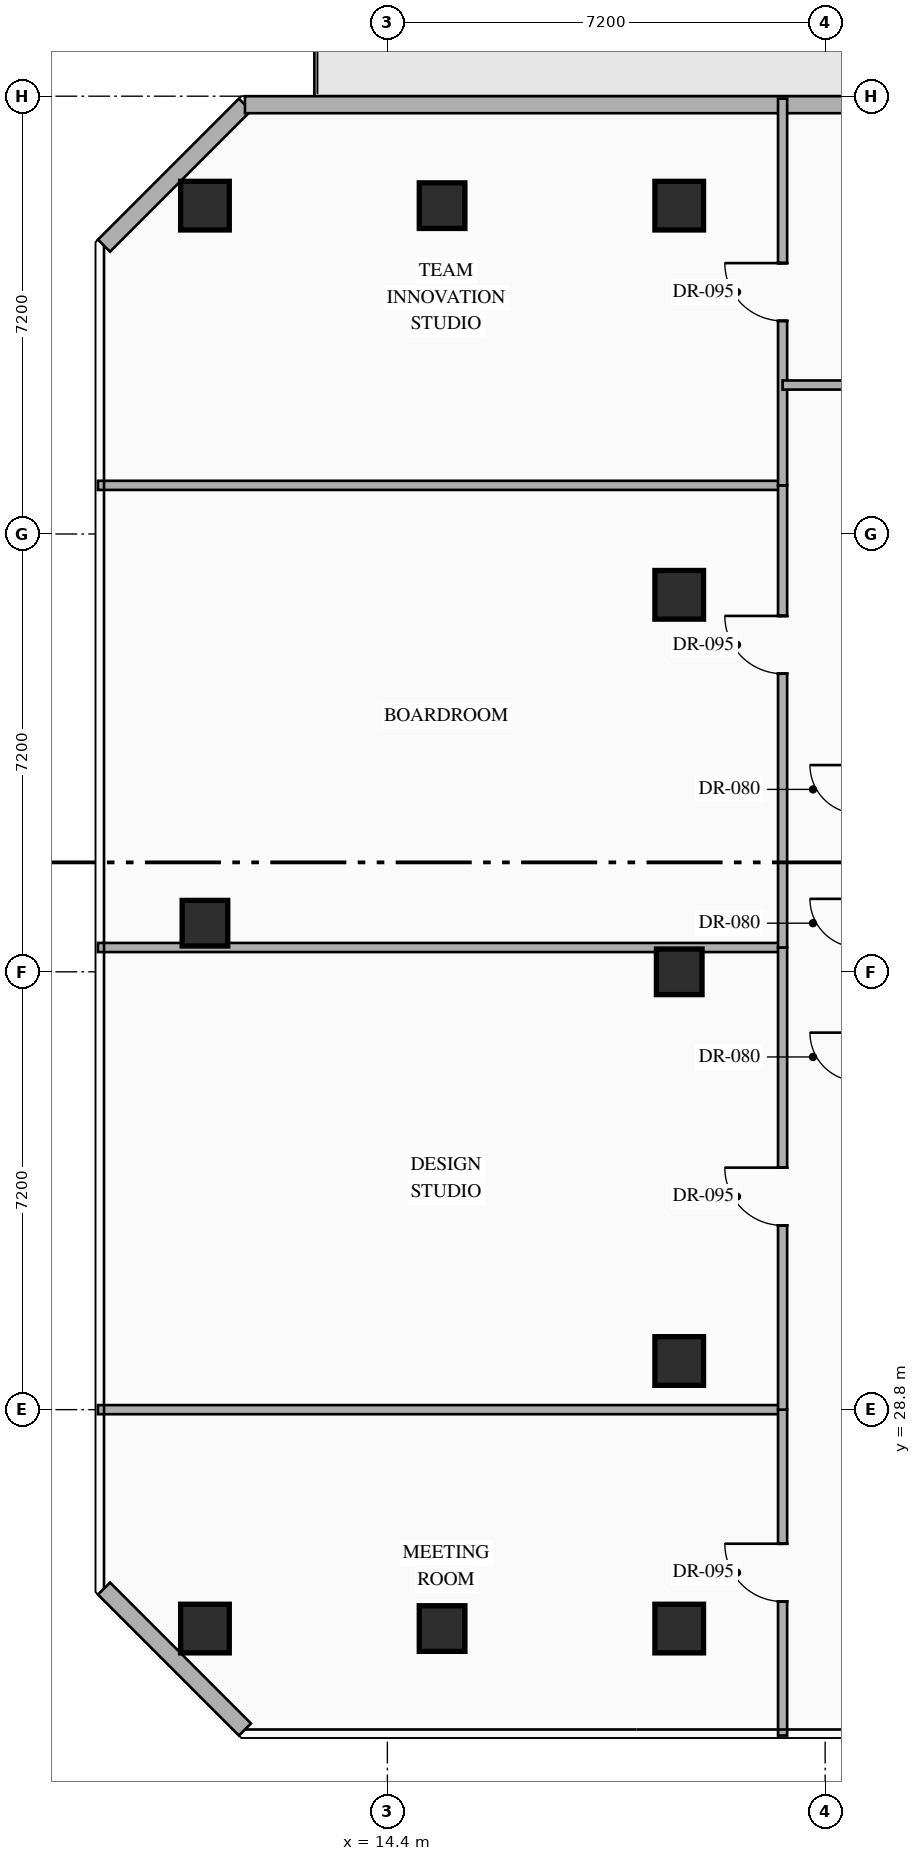
"""IFC4 building model, lengths in metres.
Left out: names, types, materials, properties, quantities, classifications, styles, units other than length and angle.
Written with IfcOpenShell. Run it as: python <this file> out.ifc"""

import sys

from ifc_helpers import new_model, si_unit, direction, frame, frame_2d, origin, origin_2d, place, context, subcontext, project, spatial, rectangle, hollow_rectangle, extrude, element, fill, save


model = new_model("IFC4")
c1 = context("Model", 3, precision=1e-05, world=origin(), true_north=direction((0.0, 1.0)))
c2 = subcontext(c1, "Body", "Model", "MODEL_VIEW")
j1 = project(units=[si_unit("LENGTHUNIT", "METRE"), si_unit("PLANEANGLEUNIT", "RADIAN")], contexts=[c1])
p1 = place(None, origin())
s1 = spatial("IfcSite", under=j1, at=p1, CompositionType="ELEMENT")
p2 = place(p1, origin())
s2 = spatial("IfcBuilding", under=s1, at=p2, CompositionType="ELEMENT")
p3 = place(p2, frame((0.0, 0.0, 178.05)))
s3 = spatial("IfcBuildingStorey", under=s2, at=p3, CompositionType="ELEMENT", Elevation=178.05)
for number, where, z_axis, x_axis in (
    (1, (11.4, 25.2, 0.0), (0.0, 0.0, 1.0), (1.0, 0.0, 0.0)),
    (2, (11.4, 48.6, 0.0), (0.0, 0.0, 1.0), (1.0, 0.0, 0.0)),
    (3, (19.2, 48.6, 0.0), (0.0, 0.0, 1.0), (1.0, 0.0, 0.0)),
    (4, (19.2, 25.2, 0.0), (0.0, 0.0, 1.0), (1.0, 0.0, 0.0)),
    (5, (19.2, 29.6, 0.0), (0.0, 0.0, 1.0), (1.0, 0.0, 0.0)),
    (6, (19.2, 42.2, 0.0), (0.0, 0.0, 1.0), (1.0, 0.0, 0.0)),
):
    element("IfcColumn", number, at=place(p3, frame(where, z_axis=z_axis, x_axis=x_axis)), inside=s3, PredefinedType="COLUMN", context=c2, shape_type="SweptSolid", body=[
        extrude(hollow_rectangle(XDim=0.8, YDim=0.8, WallThickness=0.032, at=origin_2d()), origin(), (0.0, 0.0, 1.0), 3.6),
    ])
for number, where, z_axis, x_axis in (
    (7, (11.4, 36.8, 0.0), (0.0, 0.0, 1.0), (1.0, 0.0, 0.0)),
    (8, (19.2, 36.0, 0.0), (0.0, 0.0, 1.0), (1.0, 0.0, 0.0)),
    (9, (15.3, 25.2, 0.0), (0.0, 0.0, 1.0), (1.0, 0.0, 0.0)),
    (10, (15.3, 48.6, 0.0), (0.0, 0.0, 1.0), (1.0, 0.0, 0.0)),
):
    element("IfcColumn", number, at=place(p3, frame(where, z_axis=z_axis, x_axis=x_axis)), inside=s3, PredefinedType="COLUMN", context=c2, shape_type="SweptSolid", body=[
        extrude(hollow_rectangle(XDim=0.75, YDim=0.75, WallThickness=0.028, at=origin_2d()), origin(), (0.0, 0.0, 1.0), 3.6),
    ])
p4 = place(p3, frame((12.058, 23.54, 0.0), z_axis=(0.0, 0.0, 1.0), x_axis=(-0.707144017911, 0.707069542501, 0.0)))
e11 = element("IfcWall", 11, at=p4, inside=s3, PredefinedType="STANDARD", context=c2, shape_type="SweptSolid", body=[
    extrude(rectangle(XDim=3.278, YDim=0.28, at=frame_2d((1.639, 0.0))), origin(), (0.0, 0.0, 1.0), 3.3),
])
p5 = place(p3, frame((9.74, 47.942, 0.0), z_axis=(0.0, 0.0, 1.0), x_axis=(0.707106781187, 0.707106781187, 0.0)))
e12 = element("IfcWall", 12, at=p5, inside=s3, PredefinedType="STANDARD", context=c2, shape_type="SweptSolid", body=[
    extrude(rectangle(XDim=3.278, YDim=0.28, at=frame_2d((1.639, 0.0))), origin(), (0.0, 0.0, 1.0), 3.3),
])
p6 = place(p3, frame((12.058, 50.26, 0.0), z_axis=(0.0, 0.0, 1.0), x_axis=(1.0, 0.0, 0.0)))
e13 = element("IfcWall", 13, at=p6, inside=s3, PredefinedType="STANDARD", context=c2, shape_type="SweptSolid", body=[
    extrude(rectangle(XDim=30.484, YDim=0.28, at=frame_2d((15.242, 0.0))), origin(), (0.0, 0.0, 1.0), 3.3),
])
p7 = place(p6, frame((10.424, 0.0, 0.0)))
e14 = element("IfcOpeningElement", 14, at=p7, cuts=e13, PredefinedType="OPENING", context=c2, shape_type="SweptSolid", body=[
    extrude(rectangle(XDim=1.1, YDim=2.2, at=frame_2d((0.55, 1.1))), frame((0.0, 0.15, 0.0), z_axis=(0.0, -1.0, 0.0), x_axis=(1.0, 0.0, 0.0)), (0.0, 0.0, 1.0), 0.3),
])
p8 = place(p3, frame((9.64, 28.8, 0.0), z_axis=(0.0, 0.0, 1.0), x_axis=(1.0, 0.0, 0.0)))
e15 = element("IfcWall", 15, at=p8, inside=s3, PredefinedType="PARTITIONING", context=c2, shape_type="SweptSolid", body=[
    extrude(rectangle(XDim=11.26, YDim=0.15, at=frame_2d((5.63, 0.0))), origin(), (0.0, 0.0, 1.0), 3.3),
])
p9 = place(p3, frame((20.9, 23.44, 0.0), z_axis=(0.0, 0.0, 1.0), x_axis=(0.0, 1.0, 0.0)))
e16 = element("IfcWall", 16, at=p9, inside=s3, PredefinedType="PARTITIONING", context=c2, shape_type="SweptSolid", body=[
    extrude(rectangle(XDim=5.36, YDim=0.15, at=frame_2d((2.68, 0.0))), origin(), (0.0, 0.0, 1.0), 3.3),
])
p10 = place(p9, frame((2.205, 0.0, 0.0)))
e17 = element("IfcOpeningElement", 17, at=p10, cuts=e16, PredefinedType="OPENING", context=c2, shape_type="SweptSolid", body=[
    extrude(rectangle(XDim=0.95, YDim=2.15, at=frame_2d((0.475, 1.075))), frame((0.0, 0.085, 0.0), z_axis=(0.0, -1.0, 0.0), x_axis=(1.0, 0.0, 0.0)), (0.0, 0.0, 1.0), 0.17),
])
p11 = place(p3, frame((9.64, 36.4, 0.0), z_axis=(0.0, 0.0, 1.0), x_axis=(1.0, 0.0, 0.0)))
e18 = element("IfcWall", 18, at=p11, inside=s3, PredefinedType="PARTITIONING", context=c2, shape_type="SweptSolid", body=[
    extrude(rectangle(XDim=11.26, YDim=0.15, at=frame_2d((5.63, 0.0))), origin(), (0.0, 0.0, 1.0), 2.645),
])
p12 = place(p3, frame((20.9, 28.8, 0.0), z_axis=(0.0, 0.0, 1.0), x_axis=(0.0, 1.0, 0.0)))
e19 = element("IfcWall", 19, at=p12, inside=s3, PredefinedType="PARTITIONING", context=c2, shape_type="SweptSolid", body=[
    extrude(rectangle(XDim=7.6, YDim=0.15, at=frame_2d((3.8, 0.0))), origin(), (0.0, 0.0, 1.0), 3.3),
])
p13 = place(p12, frame((3.03, 0.0, 0.0)))
e20 = element("IfcOpeningElement", 20, at=p13, cuts=e19, PredefinedType="OPENING", context=c2, shape_type="SweptSolid", body=[
    extrude(rectangle(XDim=0.95, YDim=2.15, at=frame_2d((0.475, 1.075))), frame((0.0, 0.085, 0.0), z_axis=(0.0, -1.0, 0.0), x_axis=(1.0, 0.0, 0.0)), (0.0, 0.0, 1.0), 0.17),
])
p14 = place(p3, frame((9.64, 44.0, 0.0), z_axis=(0.0, 0.0, 1.0), x_axis=(1.0, 0.0, 0.0)))
e21 = element("IfcWall", 21, at=p14, inside=s3, PredefinedType="PARTITIONING", context=c2, shape_type="SweptSolid", body=[
    extrude(rectangle(XDim=11.26, YDim=0.15, at=frame_2d((5.63, 0.0))), origin(), (0.0, 0.0, 1.0), 3.3),
])
p15 = place(p3, frame((20.9, 36.4, 0.0), z_axis=(0.0, 0.0, 1.0), x_axis=(0.0, 1.0, 0.0)))
e22 = element("IfcWall", 22, at=p15, inside=s3, PredefinedType="PARTITIONING", context=c2, shape_type="SweptSolid", body=[
    extrude(rectangle(XDim=7.6, YDim=0.15, at=frame_2d((3.8, 0.0))), origin(), (0.0, 0.0, 1.0), 3.3),
])
p16 = place(p15, frame((4.503, 0.0, 0.0)))
e23 = element("IfcOpeningElement", 23, at=p16, cuts=e22, PredefinedType="OPENING", context=c2, shape_type="SweptSolid", body=[
    extrude(rectangle(XDim=0.95, YDim=2.15, at=frame_2d((0.475, 1.075))), frame((0.0, 0.085, 0.0), z_axis=(0.0, -1.0, 0.0), x_axis=(1.0, 0.0, 0.0)), (0.0, 0.0, 1.0), 0.17),
])
p17 = place(p3, frame((20.9, 44.0, 0.0), z_axis=(0.0, 0.0, 1.0), x_axis=(0.0, 1.0, 0.0)))
e24 = element("IfcWall", 24, at=p17, inside=s3, PredefinedType="PARTITIONING", context=c2, shape_type="SweptSolid", body=[
    extrude(rectangle(XDim=6.36, YDim=0.15, at=frame_2d((3.18, 0.0))), origin(), (0.0, 0.0, 1.0), 3.3),
])
p18 = place(p17, frame((2.705, 0.0, 0.0)))
e25 = element("IfcOpeningElement", 25, at=p18, cuts=e24, PredefinedType="OPENING", context=c2, shape_type="SweptSolid", body=[
    extrude(rectangle(XDim=0.95, YDim=2.15, at=frame_2d((0.475, 1.075))), frame((0.0, 0.085, 0.0), z_axis=(0.0, -1.0, 0.0), x_axis=(1.0, 0.0, 0.0)), (0.0, 0.0, 1.0), 0.17),
])
p19 = place(p3, frame((20.9, 45.65, 0.0), z_axis=(0.0, 0.0, 1.0), x_axis=(1.0, 0.0, 0.0)))
e26 = element("IfcWall", 26, at=p19, inside=s3, PredefinedType="PARTITIONING", context=c2, shape_type="SweptSolid", body=[
    extrude(rectangle(XDim=7.5, YDim=0.15, at=frame_2d((3.75, 0.0))), origin(), (0.0, 0.0, 1.0), 2.645),
])
p20 = place(p19, frame((1.827, 0.0, 0.0)))
e27 = element("IfcOpeningElement", 27, at=p20, cuts=e26, PredefinedType="OPENING", context=c2, shape_type="SweptSolid", body=[
    extrude(rectangle(XDim=0.95, YDim=2.15, at=frame_2d((0.475, 1.075))), frame((0.0, 0.085, 0.0), z_axis=(0.0, -1.0, 0.0), x_axis=(1.0, 0.0, 0.0)), (0.0, 0.0, 1.0), 0.17),
])
p21 = place(p10, origin())
e28 = element("IfcDoor", 28, at=p21, inside=s3, OperationType="SINGLE_SWING_RIGHT", PredefinedType="DOOR", context=c2, shape_type="SweptSolid", body=[
    extrude(rectangle(XDim=0.95, YDim=2.15, at=frame_2d((0.475, 1.075))), frame((0.0, 0.025, 0.0), z_axis=(0.0, -1.0, 0.0), x_axis=(1.0, 0.0, 0.0)), (0.0, 0.0, 1.0), 0.05),
])
fill(e17, e28)
p22 = place(p13, origin())
e29 = element("IfcDoor", 29, at=p22, inside=s3, OperationType="SINGLE_SWING_RIGHT", PredefinedType="DOOR", context=c2, shape_type="SweptSolid", body=[
    extrude(rectangle(XDim=0.95, YDim=2.15, at=frame_2d((0.475, 1.075))), frame((0.0, 0.025, 0.0), z_axis=(0.0, -1.0, 0.0), x_axis=(1.0, 0.0, 0.0)), (0.0, 0.0, 1.0), 0.05),
])
fill(e20, e29)
p23 = place(p16, origin())
e30 = element("IfcDoor", 30, at=p23, inside=s3, OperationType="SINGLE_SWING_RIGHT", PredefinedType="DOOR", context=c2, shape_type="SweptSolid", body=[
    extrude(rectangle(XDim=0.95, YDim=2.15, at=frame_2d((0.475, 1.075))), frame((0.0, 0.025, 0.0), z_axis=(0.0, -1.0, 0.0), x_axis=(1.0, 0.0, 0.0)), (0.0, 0.0, 1.0), 0.05),
])
fill(e23, e30)
p24 = place(p18, origin())
e31 = element("IfcDoor", 31, at=p24, inside=s3, OperationType="SINGLE_SWING_RIGHT", PredefinedType="DOOR", context=c2, shape_type="SweptSolid", body=[
    extrude(rectangle(XDim=0.95, YDim=2.15, at=frame_2d((0.475, 1.075))), frame((0.0, 0.025, 0.0), z_axis=(0.0, -1.0, 0.0), x_axis=(1.0, 0.0, 0.0)), (0.0, 0.0, 1.0), 0.05),
])
fill(e25, e31)
save(model, sys.argv[1])
